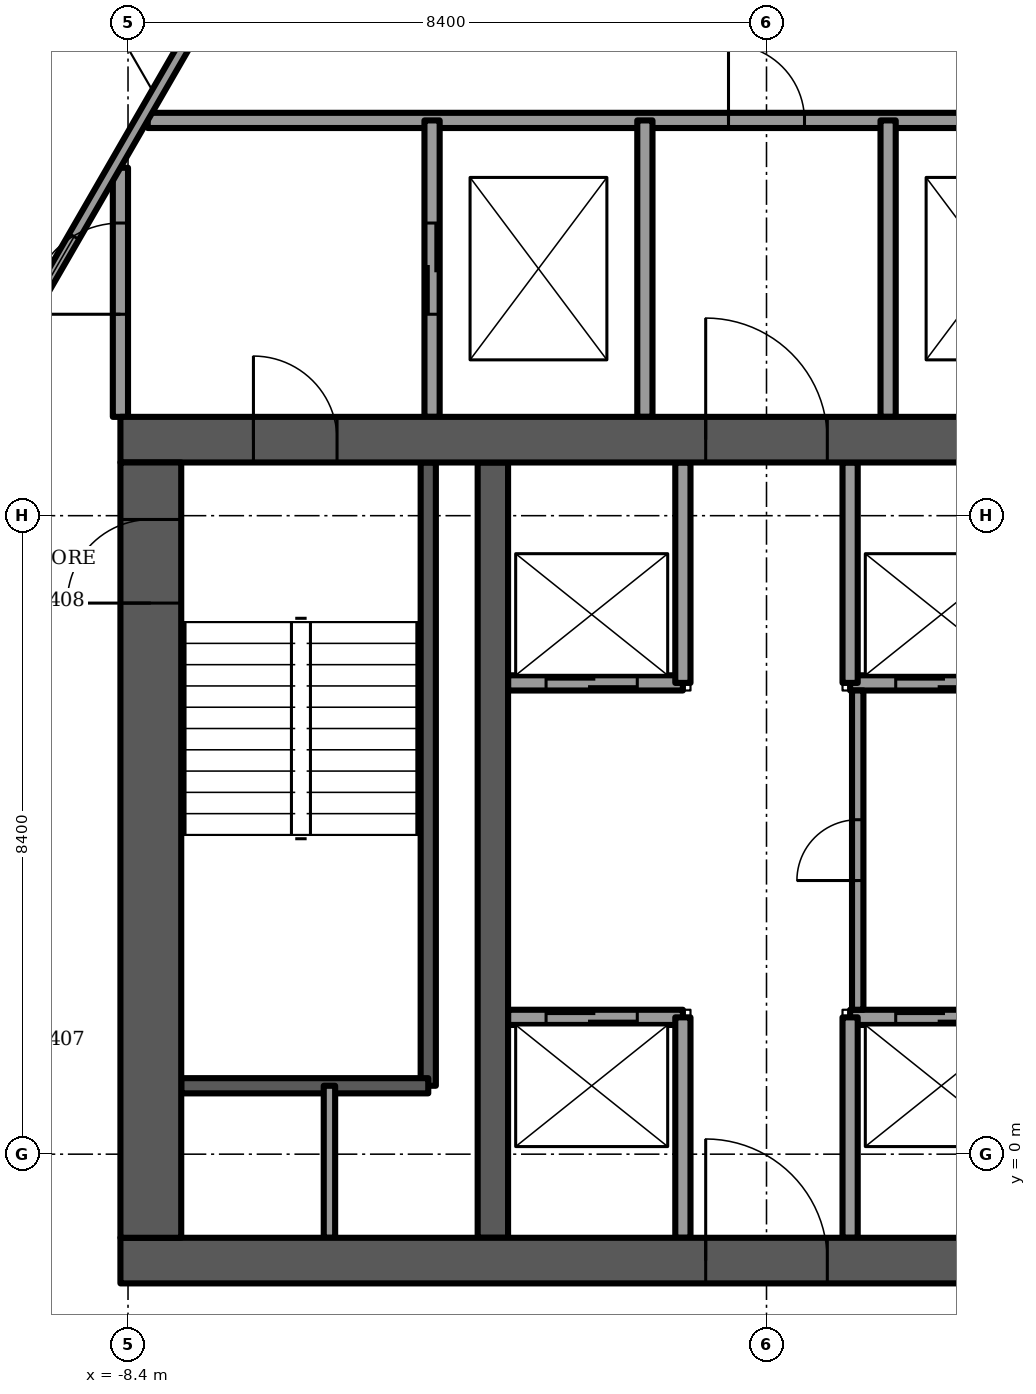
"""IFC4 building model, lengths in metres.
Left out: names, types, materials, properties, quantities, classifications, styles, units other than length and angle.
Written with IfcOpenShell. Run it as: python <this file> out.ifc"""

import sys

from ifc_helpers import new_model, si_unit, direction, frame, frame_2d, origin, place, context, subcontext, project, spatial, rectangle, extrude, element, fill, save


model = new_model("IFC4")
c1 = context("Model", 3, precision=1e-05, world=origin(), true_north=direction((0.0, 1.0)))
c2 = subcontext(c1, "Body", "Model", "MODEL_VIEW")
j1 = project(units=[si_unit("LENGTHUNIT", "METRE"), si_unit("PLANEANGLEUNIT", "RADIAN")], contexts=[c1])
p1 = place(None, origin())
s1 = spatial("IfcSite", under=j1, at=p1, CompositionType="ELEMENT")
p2 = place(p1, origin())
s2 = spatial("IfcBuilding", under=s1, at=p2, CompositionType="ELEMENT")
p3 = place(p2, frame((0.0, 0.0, 214.5)))
s3 = spatial("IfcBuildingStorey", under=s2, at=p3, CompositionType="ELEMENT", Elevation=214.5)
p4 = place(p3, frame((-8.5, -1.4, -0.3), z_axis=(0.0, 0.0, 1.0), x_axis=(1.0, 0.0, 0.0)))
e1 = element("IfcWall", 1, at=p4, inside=s3, PredefinedType="SHEAR", context=c2, shape_type="SweptSolid", body=[
    extrude(rectangle(XDim=17.0, YDim=0.6, at=frame_2d((8.5, 0.0))), origin(), (0.0, 0.0, 1.0), 3.75),
])
p5 = place(p4, frame((7.7, 0.0, 0.0)))
e2 = element("IfcOpeningElement", 2, at=p5, cuts=e1, PredefinedType="OPENING", context=c2, shape_type="SweptSolid", body=[
    extrude(rectangle(XDim=1.6, YDim=2.1, at=frame_2d((0.8, 1.05))), frame((0.0, 0.3, 0.0), z_axis=(0.0, -1.0, 0.0), x_axis=(1.0, 0.0, 0.0)), (0.0, 0.0, 1.0), 0.6),
])
p6 = place(p3, frame((-8.5, 9.4, -0.3), z_axis=(0.0, 0.0, 1.0), x_axis=(1.0, 0.0, 0.0)))
e3 = element("IfcWall", 3, at=p6, inside=s3, PredefinedType="SHEAR", context=c2, shape_type="SweptSolid", body=[
    extrude(rectangle(XDim=17.0, YDim=0.6, at=frame_2d((8.5, 0.0))), origin(), (0.0, 0.0, 1.0), 3.75),
])
p7 = place(p6, frame((7.7, 0.0, 0.0)))
e4 = element("IfcOpeningElement", 4, at=p7, cuts=e3, PredefinedType="OPENING", context=c2, shape_type="SweptSolid", body=[
    extrude(rectangle(XDim=1.6, YDim=2.1, at=frame_2d((0.8, 1.05))), frame((0.0, 0.3, 0.0), z_axis=(0.0, -1.0, 0.0), x_axis=(1.0, 0.0, 0.0)), (0.0, 0.0, 1.0), 0.6),
])
p8 = place(p6, frame((1.75, 0.0, 0.0)))
e5 = element("IfcOpeningElement", 5, at=p8, cuts=e3, PredefinedType="OPENING", context=c2, shape_type="SweptSolid", body=[
    extrude(rectangle(XDim=1.1, YDim=2.1, at=frame_2d((0.55, 1.05))), frame((0.0, 0.3, 0.0), z_axis=(0.0, -1.0, 0.0), x_axis=(1.0, 0.0, 0.0)), (0.0, 0.0, 1.0), 0.6),
])
p9 = place(p6, frame((14.15, 0.0, 0.0)))
e6 = element("IfcOpeningElement", 6, at=p9, cuts=e3, PredefinedType="OPENING", context=c2, shape_type="SweptSolid", body=[
    extrude(rectangle(XDim=1.1, YDim=2.1, at=frame_2d((0.55, 1.05))), frame((0.0, 0.3, 0.0), z_axis=(0.0, -1.0, 0.0), x_axis=(1.0, 0.0, 0.0)), (0.0, 0.0, 1.0), 0.6),
])
p10 = place(p3, frame((-8.1, -1.1, -0.3), z_axis=(0.0, 0.0, 1.0), x_axis=(0.0, 1.0, 0.0)))
e7 = element("IfcWall", 7, at=p10, inside=s3, PredefinedType="SHEAR", context=c2, shape_type="SweptSolid", body=[
    extrude(rectangle(XDim=10.2, YDim=0.8, at=frame_2d((5.1, 0.0))), origin(), (0.0, 0.0, 1.0), 3.75),
])
p11 = place(p10, frame((8.35, 0.0, 0.0)))
e8 = element("IfcOpeningElement", 8, at=p11, cuts=e7, PredefinedType="OPENING", context=c2, shape_type="SweptSolid", body=[
    extrude(rectangle(XDim=1.1, YDim=2.1, at=frame_2d((0.55, 1.05))), frame((0.0, 0.4, 0.0), z_axis=(0.0, -1.0, 0.0), x_axis=(1.0, 0.0, 0.0)), (0.0, 0.0, 1.0), 0.8),
])
p12 = place(p3, frame((-3.6, -1.1, -0.3), z_axis=(0.0, 0.0, 1.0), x_axis=(0.0, 1.0, 0.0)))
e9 = element("IfcWall", 9, at=p12, inside=s3, PredefinedType="SHEAR", context=c2, shape_type="SweptSolid", body=[
    extrude(rectangle(XDim=10.2, YDim=0.4, at=frame_2d((5.1, 0.0))), origin(), (0.0, 0.0, 1.0), 3.75),
])
p13 = place(p3, frame((-6.961, 15.792, 0.0), z_axis=(0.0, 0.0, 1.0), x_axis=(-0.49999710518, -0.866027075103, 0.0)))
e10 = element("IfcWall", 10, at=p13, inside=s3, PredefinedType="SOLIDWALL", context=c2, shape_type="SweptSolid", body=[
    extrude(rectangle(XDim=17.621, YDim=0.15, at=frame_2d((8.81, 0.0))), origin(), (0.0, 0.0, 1.0), 3.45),
])
p14 = place(p13, frame((4.296, 0.0, 0.15)))
e11 = element("IfcOpeningElement", 11, at=p14, cuts=e10, PredefinedType="OPENING", context=c2, shape_type="SweptSolid", body=[
    extrude(rectangle(XDim=1.4, YDim=2.85, at=frame_2d((0.7, 1.425))), frame((0.0, 0.075, 0.0), z_axis=(0.0, -1.0, 0.0), x_axis=(1.0, 0.0, 0.0)), (0.0, 0.0, 1.0), 0.15),
])
p15 = place(p13, frame((6.949, 0.0, 0.15)))
e12 = element("IfcOpeningElement", 12, at=p15, cuts=e10, PredefinedType="OPENING", context=c2, shape_type="SweptSolid", body=[
    extrude(rectangle(XDim=0.9, YDim=2.85, at=frame_2d((0.45, 1.425))), frame((0.0, 0.075, 0.0), z_axis=(0.0, -1.0, 0.0), x_axis=(1.0, 0.0, 0.0)), (0.0, 0.0, 1.0), 0.15),
])
p16 = place(p13, frame((8.496, 0.0, 0.15)))
e13 = element("IfcOpeningElement", 13, at=p16, cuts=e10, PredefinedType="OPENING", context=c2, shape_type="SweptSolid", body=[
    extrude(rectangle(XDim=1.4, YDim=2.85, at=frame_2d((0.7, 1.425))), frame((0.0, 0.075, 0.0), z_axis=(0.0, -1.0, 0.0), x_axis=(1.0, 0.0, 0.0)), (0.0, 0.0, 1.0), 0.15),
])
p17 = place(p13, frame((13.185, 0.0, 0.15)))
e14 = element("IfcOpeningElement", 14, at=p17, cuts=e10, PredefinedType="OPENING", context=c2, shape_type="SweptSolid", body=[
    extrude(rectangle(XDim=0.9, YDim=2.85, at=frame_2d((0.45, 1.425))), frame((0.0, 0.075, 0.0), z_axis=(0.0, -1.0, 0.0), x_axis=(1.0, 0.0, 0.0)), (0.0, 0.0, 1.0), 0.15),
])
p18 = place(p13, frame((11.085, 0.0, 0.15)))
e15 = element("IfcOpeningElement", 15, at=p18, cuts=e10, PredefinedType="OPENING", context=c2, shape_type="SweptSolid", body=[
    extrude(rectangle(XDim=1.4, YDim=2.85, at=frame_2d((0.7, 1.425))), frame((0.0, 0.075, 0.0), z_axis=(0.0, -1.0, 0.0), x_axis=(1.0, 0.0, 0.0)), (0.0, 0.0, 1.0), 0.15),
])
p19 = place(p13, frame((0.398, 0.0, 0.15)))
e16 = element("IfcOpeningElement", 16, at=p19, cuts=e10, PredefinedType="OPENING", context=c2, shape_type="SweptSolid", body=[
    extrude(rectangle(XDim=0.9, YDim=2.73, at=frame_2d((0.45, 1.365))), frame((0.0, 0.075, 0.0), z_axis=(0.0, -1.0, 0.0), x_axis=(1.0, 0.0, 0.0)), (0.0, 0.0, 1.0), 0.15),
])
p20 = place(p13, frame((15.308, 0.0, 0.15)))
e17 = element("IfcOpeningElement", 17, at=p20, cuts=e10, PredefinedType="OPENING", context=c2, shape_type="SweptSolid", body=[
    extrude(rectangle(XDim=1.5, YDim=2.73, at=frame_2d((0.75, 1.365))), frame((0.0, 0.075, 0.0), z_axis=(0.0, -1.0, 0.0), x_axis=(1.0, 0.0, 0.0)), (0.0, 0.0, 1.0), 0.15),
])
p21 = place(p3, frame((-15.772, -0.532, 0.0), z_axis=(0.0, 0.0, 1.0), x_axis=(0.500000919504, -0.866024872908, 0.0)))
e18 = element("IfcWall", 18, at=p21, inside=s3, PredefinedType="SOLIDWALL", context=c2, shape_type="SweptSolid", body=[
    extrude(rectangle(XDim=14.85, YDim=0.15, at=frame_2d((7.425, 0.0))), origin(), (0.0, 0.0, 1.0), 3.45),
])
p22 = place(p21, frame((4.884, 0.0, 0.15)))
e19 = element("IfcOpeningElement", 19, at=p22, cuts=e18, PredefinedType="OPENING", context=c2, shape_type="SweptSolid", body=[
    extrude(rectangle(XDim=1.4, YDim=2.85, at=frame_2d((0.7, 1.425))), frame((0.0, 0.075, 0.0), z_axis=(0.0, -1.0, 0.0), x_axis=(1.0, 0.0, 0.0)), (0.0, 0.0, 1.0), 0.15),
])
p23 = place(p21, frame((7.725, 0.0, 0.15)))
e20 = element("IfcOpeningElement", 20, at=p23, cuts=e18, PredefinedType="OPENING", context=c2, shape_type="SweptSolid", body=[
    extrude(rectangle(XDim=1.5, YDim=2.85, at=frame_2d((0.75, 1.425))), frame((0.0, 0.075, 0.0), z_axis=(0.0, -1.0, 0.0), x_axis=(1.0, 0.0, 0.0)), (0.0, 0.0, 1.0), 0.15),
])
p24 = place(p21, frame((9.925, 0.0, 0.0)))
e21 = element("IfcOpeningElement", 21, at=p24, cuts=e18, PredefinedType="OPENING", context=c2, shape_type="SweptSolid", body=[
    extrude(rectangle(XDim=1.4, YDim=2.4, at=frame_2d((0.7, 1.2))), frame((0.0, 0.075, 0.0), z_axis=(0.0, -1.0, 0.0), x_axis=(1.0, 0.0, 0.0)), (0.0, 0.0, 1.0), 0.15),
])
p25 = place(p21, frame((0.812, 0.0, 0.15)))
e22 = element("IfcOpeningElement", 22, at=p25, cuts=e18, PredefinedType="OPENING", context=c2, shape_type="SweptSolid", body=[
    extrude(rectangle(XDim=1.5, YDim=2.73, at=frame_2d((0.75, 1.365))), frame((0.0, 0.075, 0.0), z_axis=(0.0, -1.0, 0.0), x_axis=(1.0, 0.0, 0.0)), (0.0, 0.0, 1.0), 0.15),
])
p26 = place(p21, frame((13.632, 0.0, 0.15)))
e23 = element("IfcOpeningElement", 23, at=p26, cuts=e18, PredefinedType="OPENING", context=c2, shape_type="SweptSolid", body=[
    extrude(rectangle(XDim=0.9, YDim=2.73, at=frame_2d((0.45, 1.365))), frame((0.0, 0.075, 0.0), z_axis=(0.0, -1.0, 0.0), x_axis=(1.0, 0.0, 0.0)), (0.0, 0.0, 1.0), 0.15),
])
p27 = place(p3, frame((-3.4, 1.8, 0.0), z_axis=(0.0, 0.0, 1.0), x_axis=(1.0, 0.0, 0.0)))
e24 = element("IfcWall", 24, at=p27, inside=s3, PredefinedType="PARTITIONING", context=c2, shape_type="SweptSolid", body=[
    extrude(rectangle(XDim=2.3, YDim=0.2, at=frame_2d((1.15, 0.0))), origin(), (0.0, 0.0, 1.0), 3.45),
])
p28 = place(p27, frame((0.5, 0.0, 0.0)))
e25 = element("IfcOpeningElement", 25, at=p28, cuts=e24, PredefinedType="OPENING", context=c2, shape_type="SweptSolid", body=[
    extrude(rectangle(XDim=1.2, YDim=2.1, at=frame_2d((0.6, 1.05))), frame((0.0, 0.1, 0.0), z_axis=(0.0, -1.0, 0.0), x_axis=(1.0, 0.0, 0.0)), (0.0, 0.0, 1.0), 0.2),
])
p29 = place(p3, frame((-3.4, 6.2, 0.0), z_axis=(0.0, 0.0, 1.0), x_axis=(1.0, 0.0, 0.0)))
e26 = element("IfcWall", 26, at=p29, inside=s3, PredefinedType="PARTITIONING", context=c2, shape_type="SweptSolid", body=[
    extrude(rectangle(XDim=2.3, YDim=0.2, at=frame_2d((1.15, 0.0))), origin(), (0.0, 0.0, 1.0), 3.45),
])
p30 = place(p29, frame((0.5, 0.0, 0.0)))
e27 = element("IfcOpeningElement", 27, at=p30, cuts=e26, PredefinedType="OPENING", context=c2, shape_type="SweptSolid", body=[
    extrude(rectangle(XDim=1.2, YDim=2.1, at=frame_2d((0.6, 1.05))), frame((0.0, 0.1, 0.0), z_axis=(0.0, -1.0, 0.0), x_axis=(1.0, 0.0, 0.0)), (0.0, 0.0, 1.0), 0.2),
])
p31 = place(p3, frame((1.1, 1.8, 0.0), z_axis=(0.0, 0.0, 1.0), x_axis=(1.0, 0.0, 0.0)))
e28 = element("IfcWall", 28, at=p31, inside=s3, PredefinedType="PARTITIONING", context=c2, shape_type="SweptSolid", body=[
    extrude(rectangle(XDim=2.3, YDim=0.2, at=frame_2d((1.15, 0.0))), origin(), (0.0, 0.0, 1.0), 3.45),
])
p32 = place(p31, frame((0.6, 0.0, 0.0)))
e29 = element("IfcOpeningElement", 29, at=p32, cuts=e28, PredefinedType="OPENING", context=c2, shape_type="SweptSolid", body=[
    extrude(rectangle(XDim=1.2, YDim=2.1, at=frame_2d((0.6, 1.05))), frame((0.0, 0.1, 0.0), z_axis=(0.0, -1.0, 0.0), x_axis=(1.0, 0.0, 0.0)), (0.0, 0.0, 1.0), 0.2),
])
p33 = place(p3, frame((1.1, 6.2, 0.0), z_axis=(0.0, 0.0, 1.0), x_axis=(1.0, 0.0, 0.0)))
e30 = element("IfcWall", 30, at=p33, inside=s3, PredefinedType="PARTITIONING", context=c2, shape_type="SweptSolid", body=[
    extrude(rectangle(XDim=2.3, YDim=0.2, at=frame_2d((1.15, 0.0))), origin(), (0.0, 0.0, 1.0), 3.45),
])
p34 = place(p33, frame((0.6, 0.0, 0.0)))
e31 = element("IfcOpeningElement", 31, at=p34, cuts=e30, PredefinedType="OPENING", context=c2, shape_type="SweptSolid", body=[
    extrude(rectangle(XDim=1.2, YDim=2.1, at=frame_2d((0.6, 1.05))), frame((0.0, 0.1, 0.0), z_axis=(0.0, -1.0, 0.0), x_axis=(1.0, 0.0, 0.0)), (0.0, 0.0, 1.0), 0.2),
])
for number, where, z_axis, x_axis in (
    (32, (-1.1, -1.1, 0.0), (0.0, 0.0, 1.0), (0.0, 1.0, 0.0)),
    (33, (1.1, -1.1, 0.0), (0.0, 0.0, 1.0), (0.0, 1.0, 0.0)),
    (34, (-1.1, 6.2, 0.0), (0.0, 0.0, 1.0), (0.0, 1.0, 0.0)),
    (35, (1.1, 6.2, 0.0), (0.0, 0.0, 1.0), (0.0, 1.0, 0.0)),
):
    element("IfcWall", number, at=place(p3, frame(where, z_axis=z_axis, x_axis=x_axis)), inside=s3, PredefinedType="PARTITIONING", context=c2, shape_type="SweptSolid", body=[
        extrude(rectangle(XDim=2.9, YDim=0.2, at=frame_2d((1.45, 0.0))), origin(), (0.0, 0.0, 1.0), 3.45),
    ])
p35 = place(p3, frame((-4.45, 0.9, -0.3), z_axis=(0.0, 0.0, 1.0), x_axis=(0.0, 1.0, 0.0)))
e36 = element("IfcWall", 36, at=p35, inside=s3, PredefinedType="SOLIDWALL", context=c2, shape_type="SweptSolid", body=[
    extrude(rectangle(XDim=8.2, YDim=0.2, at=frame_2d((4.1, 0.0))), origin(), (0.0, 0.0, 1.0), 3.75),
])
p36 = place(p3, frame((-7.7, 0.9, -0.3), z_axis=(0.0, 0.0, 1.0), x_axis=(1.0, 0.0, 0.0)))
e37 = element("IfcWall", 37, at=p36, inside=s3, PredefinedType="SOLIDWALL", context=c2, shape_type="SweptSolid", body=[
    extrude(rectangle(XDim=3.25, YDim=0.2, at=frame_2d((1.625, 0.0))), origin(), (0.0, 0.0, 1.0), 3.75),
])
p37 = place(p3, frame((-5.75, -1.1, 0.0), z_axis=(0.0, 0.0, 1.0), x_axis=(0.0, 1.0, 0.0)))
e38 = element("IfcWall", 38, at=p37, inside=s3, PredefinedType="PARTITIONING", context=c2, shape_type="SweptSolid", body=[
    extrude(rectangle(XDim=2.0, YDim=0.15, at=frame_2d((1.0, 0.0))), origin(), (0.0, 0.0, 1.0), 3.45),
])
p38 = place(p3, frame((-8.141, 13.6, 0.0), z_axis=(0.0, 0.0, 1.0), x_axis=(1.0, 0.0, 0.0)))
e39 = element("IfcWall", 39, at=p38, inside=s3, PredefinedType="PARTITIONING", context=c2, shape_type="SweptSolid", body=[
    extrude(rectangle(XDim=16.281, YDim=0.2, at=frame_2d((8.141, 0.0))), origin(), (0.0, 0.0, 1.0), 3.45),
])
p39 = place(p38, frame((7.641, 0.0, 0.0)))
e40 = element("IfcOpeningElement", 40, at=p39, cuts=e39, PredefinedType="OPENING", context=c2, shape_type="SweptSolid", body=[
    extrude(rectangle(XDim=1.0, YDim=2.1, at=frame_2d((0.5, 1.05))), frame((0.0, 0.1, 0.0), z_axis=(0.0, -1.0, 0.0), x_axis=(1.0, 0.0, 0.0)), (0.0, 0.0, 1.0), 0.2),
])
p40 = place(p3, frame((-8.5, 9.7, 0.0), z_axis=(0.0, 0.0, 1.0), x_axis=(0.0, 1.0, 0.0)))
e41 = element("IfcWall", 41, at=p40, inside=s3, PredefinedType="PARTITIONING", context=c2, shape_type="SweptSolid", body=[
    extrude(rectangle(XDim=3.278, YDim=0.2, at=frame_2d((1.639, 0.0))), origin(), (0.0, 0.0, 1.0), 3.45),
])
p41 = place(p40, frame((1.35, 0.0, 0.0)))
e42 = element("IfcOpeningElement", 42, at=p41, cuts=e41, PredefinedType="OPENING", context=c2, shape_type="SweptSolid", body=[
    extrude(rectangle(XDim=1.2, YDim=2.1, at=frame_2d((0.6, 1.05))), frame((0.0, 0.1, 0.0), z_axis=(0.0, -1.0, 0.0), x_axis=(1.0, 0.0, 0.0)), (0.0, 0.0, 1.0), 0.2),
])
p42 = place(p3, frame((-4.4, 9.7, 0.0), z_axis=(0.0, 0.0, 1.0), x_axis=(0.0, 1.0, 0.0)))
e43 = element("IfcWall", 43, at=p42, inside=s3, PredefinedType="PARTITIONING", context=c2, shape_type="SweptSolid", body=[
    extrude(rectangle(XDim=3.9, YDim=0.2, at=frame_2d((1.95, 0.0))), origin(), (0.0, 0.0, 1.0), 3.45),
])
p43 = place(p42, frame((1.35, 0.0, 0.0)))
e44 = element("IfcOpeningElement", 44, at=p43, cuts=e43, PredefinedType="OPENING", context=c2, shape_type="SweptSolid", body=[
    extrude(rectangle(XDim=1.2, YDim=2.1, at=frame_2d((0.6, 1.05))), frame((0.0, 0.1, 0.0), z_axis=(0.0, -1.0, 0.0), x_axis=(1.0, 0.0, 0.0)), (0.0, 0.0, 1.0), 0.2),
])
for number, where, z_axis, x_axis in (
    (45, (-1.6, 9.7, 0.0), (0.0, 0.0, 1.0), (0.0, 1.0, 0.0)),
    (46, (1.6, 9.7, 0.0), (0.0, 0.0, 1.0), (0.0, 1.0, 0.0)),
):
    element("IfcWall", number, at=place(p3, frame(where, z_axis=z_axis, x_axis=x_axis)), inside=s3, PredefinedType="PARTITIONING", context=c2, shape_type="SweptSolid", body=[
        extrude(rectangle(XDim=3.9, YDim=0.2, at=frame_2d((1.95, 0.0))), origin(), (0.0, 0.0, 1.0), 3.45),
    ])
p44 = place(p3, frame((1.2, 1.9, 0.0), z_axis=(0.0, 0.0, 1.0), x_axis=(0.0, 1.0, 0.0)))
e47 = element("IfcWall", 47, at=p44, inside=s3, PredefinedType="PARTITIONING", context=c2, shape_type="SweptSolid", body=[
    extrude(rectangle(XDim=4.2, YDim=0.15, at=frame_2d((2.1, 0.0))), origin(), (0.0, 0.0, 1.0), 3.45),
])
p45 = place(p44, frame((1.7, 0.0, 0.0)))
e48 = element("IfcOpeningElement", 48, at=p45, cuts=e47, PredefinedType="OPENING", context=c2, shape_type="SweptSolid", body=[
    extrude(rectangle(XDim=0.8, YDim=2.1, at=frame_2d((0.4, 1.05))), frame((0.0, 0.075, 0.0), z_axis=(0.0, -1.0, 0.0), x_axis=(1.0, 0.0, 0.0)), (0.0, 0.0, 1.0), 0.15),
])
p46 = place(p14, origin())
e49 = element("IfcWindow", 49, at=p46, inside=s3, PartitioningType="SINGLE_PANEL", PredefinedType="WINDOW", context=c2, shape_type="SweptSolid", body=[
    extrude(rectangle(XDim=1.4, YDim=2.85, at=frame_2d((0.7, 1.425))), frame((0.0, 0.03, 0.0), z_axis=(0.0, -1.0, 0.0), x_axis=(1.0, 0.0, 0.0)), (0.0, 0.0, 1.0), 0.06),
])
fill(e11, e49)
p47 = place(p28, origin())
e50 = element("IfcDoor", 50, at=p47, inside=s3, OperationType="SLIDING_TO_LEFT", PredefinedType="DOOR", context=c2, shape_type="SweptSolid", body=[
    extrude(rectangle(XDim=1.2, YDim=2.1, at=frame_2d((0.6, 1.05))), frame((0.0, 0.025, 0.0), z_axis=(0.0, -1.0, 0.0), x_axis=(1.0, 0.0, 0.0)), (0.0, 0.0, 1.0), 0.05),
])
fill(e25, e50)
p48 = place(p32, origin())
e51 = element("IfcDoor", 51, at=p48, inside=s3, OperationType="SLIDING_TO_LEFT", PredefinedType="DOOR", context=c2, shape_type="SweptSolid", body=[
    extrude(rectangle(XDim=1.2, YDim=2.1, at=frame_2d((0.6, 1.05))), frame((0.0, 0.025, 0.0), z_axis=(0.0, -1.0, 0.0), x_axis=(1.0, 0.0, 0.0)), (0.0, 0.0, 1.0), 0.05),
])
fill(e29, e51)
p49 = place(p30, origin())
e52 = element("IfcDoor", 52, at=p49, inside=s3, OperationType="SLIDING_TO_LEFT", PredefinedType="DOOR", context=c2, shape_type="SweptSolid", body=[
    extrude(rectangle(XDim=1.2, YDim=2.1, at=frame_2d((0.6, 1.05))), frame((0.0, 0.025, 0.0), z_axis=(0.0, -1.0, 0.0), x_axis=(1.0, 0.0, 0.0)), (0.0, 0.0, 1.0), 0.05),
])
fill(e27, e52)
p50 = place(p34, origin())
e53 = element("IfcDoor", 53, at=p50, inside=s3, OperationType="SLIDING_TO_LEFT", PredefinedType="DOOR", context=c2, shape_type="SweptSolid", body=[
    extrude(rectangle(XDim=1.2, YDim=2.1, at=frame_2d((0.6, 1.05))), frame((0.0, 0.025, 0.0), z_axis=(0.0, -1.0, 0.0), x_axis=(1.0, 0.0, 0.0)), (0.0, 0.0, 1.0), 0.05),
])
fill(e31, e53)
p51 = place(p5, origin())
e54 = element("IfcDoor", 54, at=p51, inside=s3, OperationType="DOUBLE_DOOR_SINGLE_SWING", PredefinedType="DOOR", context=c2, shape_type="SweptSolid", body=[
    extrude(rectangle(XDim=1.6, YDim=2.1, at=frame_2d((0.8, 1.05))), frame((0.0, 0.025, 0.0), z_axis=(0.0, -1.0, 0.0), x_axis=(1.0, 0.0, 0.0)), (0.0, 0.0, 1.0), 0.05),
])
fill(e2, e54)
p52 = place(p7, origin())
e55 = element("IfcDoor", 55, at=p52, inside=s3, OperationType="DOUBLE_DOOR_SINGLE_SWING", PredefinedType="DOOR", context=c2, shape_type="SweptSolid", body=[
    extrude(rectangle(XDim=1.6, YDim=2.1, at=frame_2d((0.8, 1.05))), frame((0.0, 0.025, 0.0), z_axis=(0.0, -1.0, 0.0), x_axis=(1.0, 0.0, 0.0)), (0.0, 0.0, 1.0), 0.05),
])
fill(e4, e55)
p53 = place(p8, origin())
e56 = element("IfcDoor", 56, at=p53, inside=s3, OperationType="SINGLE_SWING_LEFT", PredefinedType="DOOR", context=c2, shape_type="SweptSolid", body=[
    extrude(rectangle(XDim=1.1, YDim=2.1, at=frame_2d((0.55, 1.05))), frame((0.0, 0.025, 0.0), z_axis=(0.0, -1.0, 0.0), x_axis=(1.0, 0.0, 0.0)), (0.0, 0.0, 1.0), 0.05),
])
fill(e5, e56)
p54 = place(p11, origin())
e57 = element("IfcDoor", 57, at=p54, inside=s3, OperationType="SINGLE_SWING_RIGHT", PredefinedType="DOOR", context=c2, shape_type="SweptSolid", body=[
    extrude(rectangle(XDim=1.1, YDim=2.1, at=frame_2d((0.55, 1.05))), frame((0.0, 0.025, 0.0), z_axis=(0.0, -1.0, 0.0), x_axis=(1.0, 0.0, 0.0)), (0.0, 0.0, 1.0), 0.05),
])
fill(e8, e57)
p55 = place(p43, origin())
e58 = element("IfcDoor", 58, at=p55, inside=s3, OperationType="SLIDING_TO_LEFT", PredefinedType="DOOR", context=c2, shape_type="SweptSolid", body=[
    extrude(rectangle(XDim=1.2, YDim=2.1, at=frame_2d((0.6, 1.05))), frame((0.0, 0.025, 0.0), z_axis=(0.0, -1.0, 0.0), x_axis=(1.0, 0.0, 0.0)), (0.0, 0.0, 1.0), 0.05),
])
fill(e44, e58)
p56 = place(p41, origin())
e59 = element("IfcDoor", 59, at=p56, inside=s3, OperationType="SINGLE_SWING_LEFT", PredefinedType="DOOR", context=c2, shape_type="SweptSolid", body=[
    extrude(rectangle(XDim=1.2, YDim=2.1, at=frame_2d((0.6, 1.05))), frame((0.0, 0.025, 0.0), z_axis=(0.0, -1.0, 0.0), x_axis=(1.0, 0.0, 0.0)), (0.0, 0.0, 1.0), 0.05),
])
fill(e42, e59)
p57 = place(p39, origin())
e60 = element("IfcDoor", 60, at=p57, inside=s3, OperationType="SINGLE_SWING_LEFT", PredefinedType="DOOR", context=c2, shape_type="SweptSolid", body=[
    extrude(rectangle(XDim=1.0, YDim=2.1, at=frame_2d((0.5, 1.05))), frame((0.0, 0.025, 0.0), z_axis=(0.0, -1.0, 0.0), x_axis=(1.0, 0.0, 0.0)), (0.0, 0.0, 1.0), 0.05),
])
fill(e40, e60)
p58 = place(p45, origin())
e61 = element("IfcDoor", 61, at=p58, inside=s3, OperationType="SINGLE_SWING_RIGHT", PredefinedType="DOOR", context=c2, shape_type="SweptSolid", body=[
    extrude(rectangle(XDim=0.8, YDim=2.1, at=frame_2d((0.4, 1.05))), frame((0.0, 0.025, 0.0), z_axis=(0.0, -1.0, 0.0), x_axis=(1.0, 0.0, 0.0)), (0.0, 0.0, 1.0), 0.05),
])
fill(e48, e61)
save(model, sys.argv[1])
